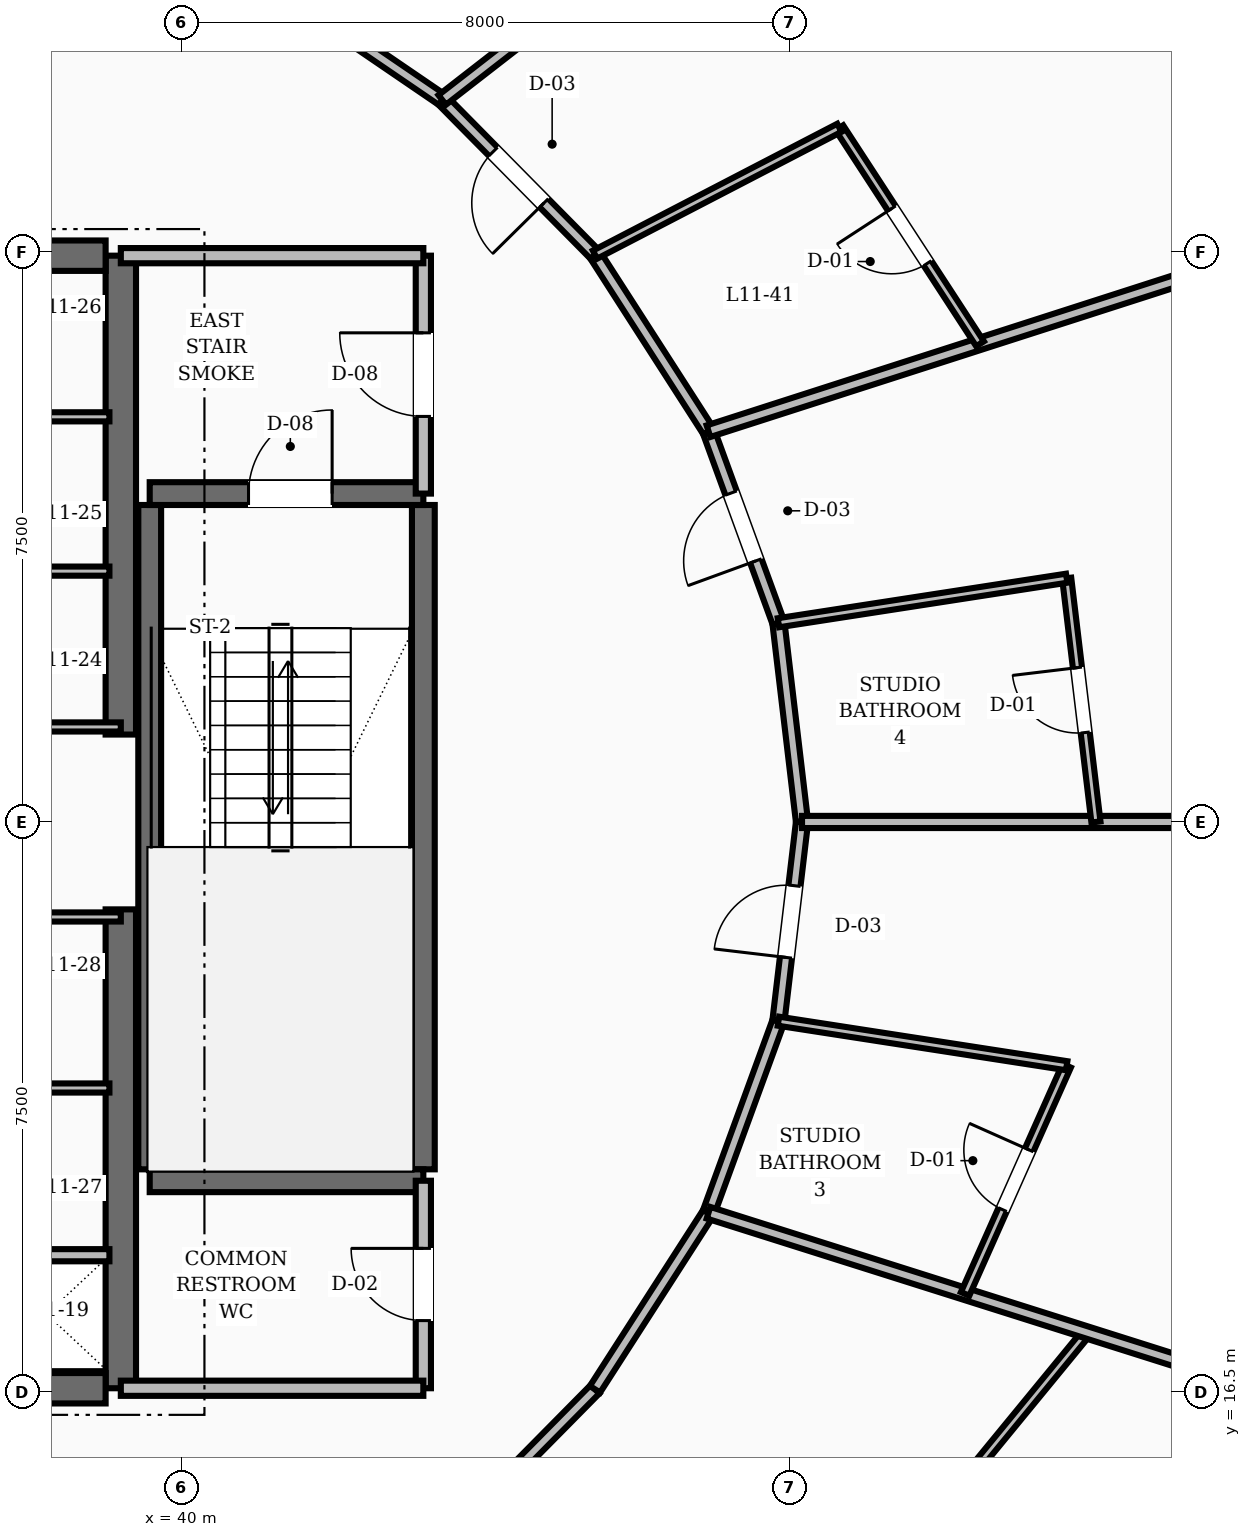
"""IFC4 building model, lengths in metres.
Left out: names, types, materials, properties, quantities, classifications, styles, units other than length and angle.
Written with IfcOpenShell. Run it as: python <this file> out.ifc"""

import sys

from ifc_helpers import new_model, si_unit, direction, frame, frame_2d, origin, place, context, subcontext, project, spatial, rectangle, extrude, element, fill, save


model = new_model("IFC4")
c1 = context("Model", 3, precision=1e-05, world=origin(), true_north=direction((0.0, 1.0)))
c2 = subcontext(c1, "Body", "Model", "MODEL_VIEW")
j1 = project(units=[si_unit("LENGTHUNIT", "METRE"), si_unit("PLANEANGLEUNIT", "RADIAN")], contexts=[c1])
p1 = place(None, origin())
s1 = spatial("IfcSite", under=j1, at=p1, CompositionType="ELEMENT")
p2 = place(p1, origin())
s2 = spatial("IfcBuilding", under=s1, at=p2, CompositionType="ELEMENT")
p3 = place(p2, frame((0.0, 0.0, 48.4)))
s3 = spatial("IfcBuildingStorey", under=s2, at=p3, CompositionType="ELEMENT", Elevation=48.4)
for number, where, z_axis, x_axis in (
    (1, (39.2, 16.55, 0.0), (0.0, 0.0, 1.0), (0.0, 1.0, 0.0)),
    (2, (39.2, 25.15, 0.0), (0.0, 0.0, 1.0), (0.0, 1.0, 0.0)),
):
    element("IfcWall", number, at=place(p3, frame(where, z_axis=z_axis, x_axis=x_axis)), inside=s3, PredefinedType="SHEAR", context=c2, shape_type="SweptSolid", body=[
        extrude(rectangle(XDim=6.3, YDim=0.4, at=frame_2d((3.15, 0.0))), origin(), (0.0, 0.0, 1.0), 3.6),
    ])
p4 = place(p3, frame((35.8, 16.55, 0.0), z_axis=(0.0, 0.0, 1.0), x_axis=(1.0, 0.0, 0.0)))
e3 = element("IfcWall", 3, at=p4, inside=s3, PredefinedType="SHEAR", context=c2, shape_type="SweptSolid", body=[
    extrude(rectangle(XDim=3.2, YDim=0.4, at=frame_2d((1.6, 0.0))), origin(), (0.0, 0.0, 1.0), 3.6),
])
p5 = place(p4, frame((0.3, 0.0, 0.0)))
e4 = element("IfcOpeningElement", 4, at=p5, cuts=e3, PredefinedType="OPENING", context=c2, shape_type="SweptSolid", body=[
    extrude(rectangle(XDim=1.1, YDim=2.1, at=frame_2d((0.55, 1.05))), frame((0.0, 0.21, 0.0), z_axis=(0.0, -1.0, 0.0), x_axis=(1.0, 0.0, 0.0)), (0.0, 0.0, 1.0), 0.42),
])
p6 = place(p3, frame((35.8, 31.45, 0.0), z_axis=(0.0, 0.0, 1.0), x_axis=(1.0, 0.0, 0.0)))
e5 = element("IfcWall", 5, at=p6, inside=s3, PredefinedType="SHEAR", context=c2, shape_type="SweptSolid", body=[
    extrude(rectangle(XDim=3.2, YDim=0.4, at=frame_2d((1.6, 0.0))), origin(), (0.0, 0.0, 1.0), 3.6),
])
p7 = place(p6, frame((0.3, 0.0, 0.0)))
e6 = element("IfcOpeningElement", 6, at=p7, cuts=e5, PredefinedType="OPENING", context=c2, shape_type="SweptSolid", body=[
    extrude(rectangle(XDim=1.1, YDim=2.1, at=frame_2d((0.55, 1.05))), frame((0.0, 0.21, 0.0), z_axis=(0.0, -1.0, 0.0), x_axis=(1.0, 0.0, 0.0)), (0.0, 0.0, 1.0), 0.42),
])
for number, where, z_axis, x_axis in (
    (7, (43.18, 19.43, 0.0), (0.0, 0.0, 1.0), (0.0, 1.0, 0.0)),
    (8, (39.58, 19.43, 0.0), (0.0, 0.0, 1.0), (0.0, 1.0, 0.0)),
):
    element("IfcWall", number, at=place(p3, frame(where, z_axis=z_axis, x_axis=x_axis)), inside=s3, PredefinedType="SHEAR", context=c2, shape_type="SweptSolid", body=[
        extrude(rectangle(XDim=8.74, YDim=0.3, at=frame_2d((4.37, 0.0))), origin(), (0.0, 0.0, 1.0), 3.6),
    ])
p8 = place(p3, frame((39.58, 19.28, 0.0), z_axis=(0.0, 0.0, 1.0), x_axis=(1.0, 0.0, 0.0)))
e9 = element("IfcWall", 9, at=p8, inside=s3, PredefinedType="SHEAR", context=c2, shape_type="SweptSolid", body=[
    extrude(rectangle(XDim=3.6, YDim=0.3, at=frame_2d((1.8, 0.0))), origin(), (0.0, 0.0, 1.0), 3.6),
])
p9 = place(p3, frame((39.58, 28.32, 0.0), z_axis=(0.0, 0.0, 1.0), x_axis=(1.0, 0.0, 0.0)))
e10 = element("IfcWall", 10, at=p9, inside=s3, PredefinedType="SHEAR", context=c2, shape_type="SweptSolid", body=[
    extrude(rectangle(XDim=3.6, YDim=0.3, at=frame_2d((1.8, 0.0))), origin(), (0.0, 0.0, 1.0), 3.6),
])
p10 = place(p9, frame((1.3, 0.0, 0.0)))
e11 = element("IfcOpeningElement", 11, at=p10, cuts=e10, PredefinedType="OPENING", context=c2, shape_type="SweptSolid", body=[
    extrude(rectangle(XDim=1.1, YDim=2.1, at=frame_2d((0.55, 1.05))), frame((0.0, 0.16, 0.0), z_axis=(0.0, -1.0, 0.0), x_axis=(1.0, 0.0, 0.0)), (0.0, 0.0, 1.0), 0.32),
])
p11 = place(p3, frame((43.18, 28.32, 0.0), z_axis=(0.0, 0.0, 1.0), x_axis=(0.0, 1.0, 0.0)))
e12 = element("IfcWall", 12, at=p11, inside=s3, PredefinedType="SOLIDWALL", context=c2, shape_type="SweptSolid", body=[
    extrude(rectangle(XDim=3.13, YDim=0.2, at=frame_2d((1.565, 0.0))), origin(), (0.0, 0.0, 1.0), 2.61),
])
p12 = place(p11, frame((1.015, 0.0, 0.0)))
e13 = element("IfcOpeningElement", 13, at=p12, cuts=e12, PredefinedType="OPENING", context=c2, shape_type="SweptSolid", body=[
    extrude(rectangle(XDim=1.1, YDim=2.1, at=frame_2d((0.55, 1.05))), frame((0.0, 0.11, 0.0), z_axis=(0.0, -1.0, 0.0), x_axis=(1.0, 0.0, 0.0)), (0.0, 0.0, 1.0), 0.22),
])
p13 = place(p3, frame((39.2, 31.45, 0.0), z_axis=(0.0, 0.0, 1.0), x_axis=(1.0, 0.0, 0.0)))
e14 = element("IfcWall", 14, at=p13, inside=s3, PredefinedType="SOLIDWALL", context=c2, shape_type="SweptSolid", body=[
    extrude(rectangle(XDim=3.98, YDim=0.2, at=frame_2d((1.99, 0.0))), origin(), (0.0, 0.0, 1.0), 2.61),
])
p14 = place(p3, frame((43.18, 16.55, 0.0), z_axis=(0.0, 0.0, 1.0), x_axis=(0.0, 1.0, 0.0)))
e15 = element("IfcWall", 15, at=p14, inside=s3, PredefinedType="SOLIDWALL", context=c2, shape_type="SweptSolid", body=[
    extrude(rectangle(XDim=2.73, YDim=0.2, at=frame_2d((1.365, 0.0))), origin(), (0.0, 0.0, 1.0), 2.61),
])
p15 = place(p14, frame((0.89, 0.0, 0.0)))
e16 = element("IfcOpeningElement", 16, at=p15, cuts=e15, PredefinedType="OPENING", context=c2, shape_type="SweptSolid", body=[
    extrude(rectangle(XDim=0.95, YDim=2.1, at=frame_2d((0.475, 1.05))), frame((0.0, 0.11, 0.0), z_axis=(0.0, -1.0, 0.0), x_axis=(1.0, 0.0, 0.0)), (0.0, 0.0, 1.0), 0.22),
])
p16 = place(p3, frame((39.2, 16.55, 0.0), z_axis=(0.0, 0.0, 1.0), x_axis=(1.0, 0.0, 0.0)))
e17 = element("IfcWall", 17, at=p16, inside=s3, PredefinedType="SOLIDWALL", context=c2, shape_type="SweptSolid", body=[
    extrude(rectangle(XDim=3.98, YDim=0.2, at=frame_2d((1.99, 0.0))), origin(), (0.0, 0.0, 1.0), 2.61),
])
p17 = place(p3, frame((37.4, 18.3, 0.0), z_axis=(0.0, 0.0, 1.0), x_axis=(1.0, 0.0, 0.0)))
e18 = element("IfcWall", 18, at=p17, inside=s3, PredefinedType="SOLIDWALL", context=c2, shape_type="SweptSolid", body=[
    extrude(rectangle(XDim=1.65, YDim=0.16, at=frame_2d((0.825, 0.0))), origin(), (0.0, 0.0, 1.0), 2.61),
])
for number, where, z_axis, x_axis in (
    (19, (37.4, 25.25, 0.0), (0.0, 0.0, 1.0), (1.0, 0.0, 0.0)),
    (20, (37.4, 22.75, 0.0), (0.0, 0.0, 1.0), (1.0, 0.0, 0.0)),
):
    element("IfcWall", number, at=place(p3, frame(where, z_axis=z_axis, x_axis=x_axis)), inside=s3, PredefinedType="PARTITIONING", context=c2, shape_type="SweptSolid", body=[
        extrude(rectangle(XDim=1.8, YDim=0.12, at=frame_2d((0.9, 0.0))), origin(), (0.0, 0.0, 1.0), 2.61),
    ])
for number, where, z_axis, x_axis in (
    (21, (37.4, 27.3, 0.0), (0.0, 0.0, 1.0), (1.0, 0.0, 0.0)),
    (22, (37.4, 29.33, 0.0), (0.0, 0.0, 1.0), (1.0, 0.0, 0.0)),
    (23, (37.4, 20.5, 0.0), (0.0, 0.0, 1.0), (1.0, 0.0, 0.0)),
):
    element("IfcWall", number, at=place(p3, frame(where, z_axis=z_axis, x_axis=x_axis)), inside=s3, PredefinedType="PARTITIONING", context=c2, shape_type="SweptSolid", body=[
        extrude(rectangle(XDim=1.65, YDim=0.12, at=frame_2d((0.825, 0.0))), origin(), (0.0, 0.0, 1.0), 2.61),
    ])
p18 = place(p3, frame((48.162, 24.0, 0.0), z_axis=(0.0, 0.0, 1.0), x_axis=(-0.117667763342, 0.993053018459, 0.0)))
e24 = element("IfcWall", 24, at=p18, inside=s3, PredefinedType="SOLIDWALL", context=c2, shape_type="SweptSolid", body=[
    extrude(rectangle(XDim=2.639, YDim=0.16, at=frame_2d((1.32, 0.0))), origin(), (0.0, 0.0, 1.0), 2.61),
])
p19 = place(p3, frame((47.852, 26.621, 0.0), z_axis=(0.0, 0.0, 1.0), x_axis=(-0.342882618672, 0.939378257047, 0.0)))
e25 = element("IfcWall", 25, at=p19, inside=s3, PredefinedType="SOLIDWALL", context=c2, shape_type="SweptSolid", body=[
    extrude(rectangle(XDim=2.683, YDim=0.16, at=frame_2d((1.341, 0.0))), origin(), (0.0, 0.0, 1.0), 2.61),
])
p20 = place(p19, frame((0.866, 0.0, 0.0)))
e26 = element("IfcOpeningElement", 26, at=p20, cuts=e25, PredefinedType="OPENING", context=c2, shape_type="SweptSolid", body=[
    extrude(rectangle(XDim=0.95, YDim=2.1, at=frame_2d((0.475, 1.05))), frame((0.0, 0.09, 0.0), z_axis=(0.0, -1.0, 0.0), x_axis=(1.0, 0.0, 0.0)), (0.0, 0.0, 1.0), 0.18),
])
p21 = place(p3, frame((46.932, 29.141, 0.0), z_axis=(0.0, 0.0, 1.0), x_axis=(-0.540891657444, 0.841092274907, 0.0)))
e27 = element("IfcWall", 27, at=p21, inside=s3, PredefinedType="SOLIDWALL", context=c2, shape_type="SweptSolid", body=[
    extrude(rectangle(XDim=2.761, YDim=0.16, at=frame_2d((1.38, 0.0))), origin(), (0.0, 0.0, 1.0), 2.61),
])
p22 = place(p3, frame((45.438, 31.463, 0.0), z_axis=(0.0, 0.0, 1.0), x_axis=(-0.702569520063, 0.711615113301, 0.0)))
e28 = element("IfcWall", 28, at=p22, inside=s3, PredefinedType="SOLIDWALL", context=c2, shape_type="SweptSolid", body=[
    extrude(rectangle(XDim=2.861, YDim=0.16, at=frame_2d((1.43, 0.0))), origin(), (0.0, 0.0, 1.0), 2.61),
])
p23 = place(p22, frame((0.955, 0.0, 0.0)))
e29 = element("IfcOpeningElement", 29, at=p23, cuts=e28, PredefinedType="OPENING", context=c2, shape_type="SweptSolid", body=[
    extrude(rectangle(XDim=0.95, YDim=2.1, at=frame_2d((0.475, 1.05))), frame((0.0, 0.09, 0.0), z_axis=(0.0, -1.0, 0.0), x_axis=(1.0, 0.0, 0.0)), (0.0, 0.0, 1.0), 0.18),
])
p24 = place(p3, frame((43.428, 33.499, 0.0), z_axis=(0.0, 0.0, 1.0), x_axis=(-0.826112340767, 0.563505457323, 0.0)))
e30 = element("IfcWall", 30, at=p24, inside=s3, PredefinedType="SOLIDWALL", context=c2, shape_type="SweptSolid", body=[
    extrude(rectangle(XDim=2.965, YDim=0.16, at=frame_2d((1.482, 0.0))), origin(), (0.0, 0.0, 1.0), 2.61),
])
p25 = place(p3, frame((43.428, 14.501, 0.0), z_axis=(0.0, 0.0, 1.0), x_axis=(0.702569520063, 0.711615113301, 0.0)))
e31 = element("IfcWall", 31, at=p25, inside=s3, PredefinedType="SOLIDWALL", context=c2, shape_type="SweptSolid", body=[
    extrude(rectangle(XDim=2.861, YDim=0.16, at=frame_2d((1.43, 0.0))), origin(), (0.0, 0.0, 1.0), 2.61),
])
p26 = place(p3, frame((45.438, 16.537, 0.0), z_axis=(0.0, 0.0, 1.0), x_axis=(0.540891657444, 0.841092274907, 0.0)))
e32 = element("IfcWall", 32, at=p26, inside=s3, PredefinedType="SOLIDWALL", context=c2, shape_type="SweptSolid", body=[
    extrude(rectangle(XDim=2.761, YDim=0.16, at=frame_2d((1.38, 0.0))), origin(), (0.0, 0.0, 1.0), 2.61),
])
p27 = place(p3, frame((46.932, 18.859, 0.0), z_axis=(0.0, 0.0, 1.0), x_axis=(0.342882618672, 0.939378257047, 0.0)))
e33 = element("IfcWall", 33, at=p27, inside=s3, PredefinedType="SOLIDWALL", context=c2, shape_type="SweptSolid", body=[
    extrude(rectangle(XDim=2.683, YDim=0.16, at=frame_2d((1.341, 0.0))), origin(), (0.0, 0.0, 1.0), 2.61),
])
p28 = place(p3, frame((47.852, 21.379, 0.0), z_axis=(0.0, 0.0, 1.0), x_axis=(0.117667763342, 0.993053018459, 0.0)))
e34 = element("IfcWall", 34, at=p28, inside=s3, PredefinedType="SOLIDWALL", context=c2, shape_type="SweptSolid", body=[
    extrude(rectangle(XDim=2.639, YDim=0.16, at=frame_2d((1.32, 0.0))), origin(), (0.0, 0.0, 1.0), 2.61),
])
p29 = place(p28, frame((0.844, 0.0, 0.0)))
e35 = element("IfcOpeningElement", 35, at=p29, cuts=e34, PredefinedType="OPENING", context=c2, shape_type="SweptSolid", body=[
    extrude(rectangle(XDim=0.95, YDim=2.1, at=frame_2d((0.475, 1.05))), frame((0.0, 0.09, 0.0), z_axis=(0.0, -1.0, 0.0), x_axis=(1.0, 0.0, 0.0)), (0.0, 0.0, 1.0), 0.18),
])
p30 = place(p3, frame((47.236, 11.593, 0.0), z_axis=(0.0, 0.0, 1.0), x_axis=(0.634298828671, 0.773087961326, 0.0)))
e36 = element("IfcWall", 36, at=p30, inside=s3, PredefinedType="PARTITIONING", context=c2, shape_type="SweptSolid", body=[
    extrude(rectangle(XDim=7.364, YDim=0.12, at=frame_2d((3.682, 0.0))), origin(), (0.0, 0.0, 1.0), 2.61),
])
p31 = place(p30, frame((3.207, 0.0, 0.0)))
e37 = element("IfcOpeningElement", 37, at=p31, cuts=e36, PredefinedType="OPENING", context=c2, shape_type="SweptSolid", body=[
    extrude(rectangle(XDim=0.95, YDim=2.1, at=frame_2d((0.475, 1.05))), frame((0.0, 0.07, 0.0), z_axis=(0.0, -1.0, 0.0), x_axis=(1.0, 0.0, 0.0)), (0.0, 0.0, 1.0), 0.14),
])
p32 = place(p3, frame((46.932, 18.859, 0.0), z_axis=(0.0, 0.0, 1.0), x_axis=(0.953436442202, -0.301594016322, 0.0)))
e38 = element("IfcWall", 38, at=p32, inside=s3, PredefinedType="SOLIDWALL", context=c2, shape_type="SweptSolid", body=[
    extrude(rectangle(XDim=9.268, YDim=0.16, at=frame_2d((4.634, 0.0))), origin(), (0.0, 0.0, 1.0), 2.61),
])
p33 = place(p3, frame((50.308, 17.791, 0.0), z_axis=(0.0, 0.0, 1.0), x_axis=(0.406676057564, 0.913572429643, 0.0)))
e39 = element("IfcWall", 39, at=p33, inside=s3, PredefinedType="PARTITIONING", context=c2, shape_type="SweptSolid", body=[
    extrude(rectangle(XDim=3.286, YDim=0.12, at=frame_2d((1.643, 0.0))), origin(), (0.0, 0.0, 1.0), 2.61),
])
p34 = place(p33, frame((1.213, 0.0, 0.0)))
e40 = element("IfcOpeningElement", 40, at=p34, cuts=e39, PredefinedType="OPENING", context=c2, shape_type="SweptSolid", body=[
    extrude(rectangle(XDim=0.86, YDim=2.1, at=frame_2d((0.43, 1.05))), frame((0.0, 0.07, 0.0), z_axis=(0.0, -1.0, 0.0), x_axis=(1.0, 0.0, 0.0)), (0.0, 0.0, 1.0), 0.14),
])
p35 = place(p3, frame((47.852, 21.379, 0.0), z_axis=(0.0, 0.0, 1.0), x_axis=(0.988274411208, -0.152688205671, 0.0)))
e41 = element("IfcWall", 41, at=p35, inside=s3, PredefinedType="PARTITIONING", context=c2, shape_type="SweptSolid", body=[
    extrude(rectangle(XDim=3.837, YDim=0.12, at=frame_2d((1.919, 0.0))), origin(), (0.0, 0.0, 1.0), 2.61),
])
p36 = place(p3, frame((48.162, 24.0, 0.0), z_axis=(0.0, 0.0, 1.0), x_axis=(1.0, 0.0, 0.0)))
e42 = element("IfcWall", 42, at=p36, inside=s3, PredefinedType="SOLIDWALL", context=c2, shape_type="SweptSolid", body=[
    extrude(rectangle(XDim=10.126, YDim=0.16, at=frame_2d((5.063, 0.0))), origin(), (0.0, 0.0, 1.0), 2.61),
])
p37 = place(p3, frame((52.029, 24.0, 0.0), z_axis=(0.0, 0.0, 1.0), x_axis=(-0.119130317154, 0.992878626789, 0.0)))
e43 = element("IfcWall", 43, at=p37, inside=s3, PredefinedType="PARTITIONING", context=c2, shape_type="SweptSolid", body=[
    extrude(rectangle(XDim=3.23, YDim=0.12, at=frame_2d((1.615, 0.0))), origin(), (0.0, 0.0, 1.0), 2.61),
])
p38 = place(p37, frame((1.185, 0.0, 0.0)))
e44 = element("IfcOpeningElement", 44, at=p38, cuts=e43, PredefinedType="OPENING", context=c2, shape_type="SweptSolid", body=[
    extrude(rectangle(XDim=0.86, YDim=2.1, at=frame_2d((0.43, 1.05))), frame((0.0, 0.07, 0.0), z_axis=(0.0, -1.0, 0.0), x_axis=(1.0, 0.0, 0.0)), (0.0, 0.0, 1.0), 0.14),
])
p39 = place(p3, frame((47.852, 26.621, 0.0), z_axis=(0.0, 0.0, 1.0), x_axis=(0.988274411208, 0.152688205671, 0.0)))
e45 = element("IfcWall", 45, at=p39, inside=s3, PredefinedType="PARTITIONING", context=c2, shape_type="SweptSolid", body=[
    extrude(rectangle(XDim=3.837, YDim=0.12, at=frame_2d((1.919, 0.0))), origin(), (0.0, 0.0, 1.0), 2.61),
])
p40 = place(p3, frame((46.932, 29.141, 0.0), z_axis=(0.0, 0.0, 1.0), x_axis=(0.951948128821, 0.306259301956, 0.0)))
e46 = element("IfcWall", 46, at=p40, inside=s3, PredefinedType="SOLIDWALL", context=c2, shape_type="SweptSolid", body=[
    extrude(rectangle(XDim=9.826, YDim=0.16, at=frame_2d((4.913, 0.0))), origin(), (0.0, 0.0, 1.0), 2.61),
])
p41 = place(p3, frame((50.504, 30.29, 0.0), z_axis=(0.0, 0.0, 1.0), x_axis=(-0.54574723604, 0.837949851933, 0.0)))
e47 = element("IfcWall", 47, at=p41, inside=s3, PredefinedType="PARTITIONING", context=c2, shape_type="SweptSolid", body=[
    extrude(rectangle(XDim=3.391, YDim=0.12, at=frame_2d((1.696, 0.0))), origin(), (0.0, 0.0, 1.0), 2.61),
])
p42 = place(p41, frame((1.266, 0.0, 0.0)))
e48 = element("IfcOpeningElement", 48, at=p42, cuts=e47, PredefinedType="OPENING", context=c2, shape_type="SweptSolid", body=[
    extrude(rectangle(XDim=0.86, YDim=2.1, at=frame_2d((0.43, 1.05))), frame((0.0, 0.07, 0.0), z_axis=(0.0, -1.0, 0.0), x_axis=(1.0, 0.0, 0.0)), (0.0, 0.0, 1.0), 0.14),
])
p43 = place(p3, frame((45.438, 31.463, 0.0), z_axis=(0.0, 0.0, 1.0), x_axis=(0.887571866108, 0.460669276699, 0.0)))
e49 = element("IfcWall", 49, at=p43, inside=s3, PredefinedType="PARTITIONING", context=c2, shape_type="SweptSolid", body=[
    extrude(rectangle(XDim=3.622, YDim=0.12, at=frame_2d((1.811, 0.0))), origin(), (0.0, 0.0, 1.0), 2.61),
])
p44 = place(p3, frame((43.428, 33.499, 0.0), z_axis=(0.0, 0.0, 1.0), x_axis=(0.789749576514, 0.613429381751, 0.0)))
e50 = element("IfcWall", 50, at=p44, inside=s3, PredefinedType="SOLIDWALL", context=c2, shape_type="SweptSolid", body=[
    extrude(rectangle(XDim=9.061, YDim=0.16, at=frame_2d((4.531, 0.0))), origin(), (0.0, 0.0, 1.0), 2.61),
])
p45 = place(p10, origin())
e51 = element("IfcDoor", 51, at=p45, inside=s3, OperationType="SINGLE_SWING_RIGHT", PredefinedType="DOOR", context=c2, shape_type="SweptSolid", body=[
    extrude(rectangle(XDim=1.1, YDim=2.1, at=frame_2d((0.55, 1.05))), frame((0.0, 0.025, 0.0), z_axis=(0.0, -1.0, 0.0), x_axis=(1.0, 0.0, 0.0)), (0.0, 0.0, 1.0), 0.05),
])
fill(e11, e51)
p46 = place(p12, origin())
e52 = element("IfcDoor", 52, at=p46, inside=s3, OperationType="SINGLE_SWING_RIGHT", PredefinedType="DOOR", context=c2, shape_type="SweptSolid", body=[
    extrude(rectangle(XDim=1.1, YDim=2.1, at=frame_2d((0.55, 1.05))), frame((0.0, 0.025, 0.0), z_axis=(0.0, -1.0, 0.0), x_axis=(1.0, 0.0, 0.0)), (0.0, 0.0, 1.0), 0.05),
])
fill(e13, e52)
p47 = place(p15, origin())
e53 = element("IfcDoor", 53, at=p47, inside=s3, OperationType="SINGLE_SWING_RIGHT", PredefinedType="DOOR", context=c2, shape_type="SweptSolid", body=[
    extrude(rectangle(XDim=0.95, YDim=2.1, at=frame_2d((0.475, 1.05))), frame((0.0, 0.025, 0.0), z_axis=(0.0, -1.0, 0.0), x_axis=(1.0, 0.0, 0.0)), (0.0, 0.0, 1.0), 0.05),
])
fill(e16, e53)
p48 = place(p34, origin())
e54 = element("IfcDoor", 54, at=p48, inside=s3, OperationType="SINGLE_SWING_RIGHT", PredefinedType="DOOR", context=c2, shape_type="SweptSolid", body=[
    extrude(rectangle(XDim=0.86, YDim=2.1, at=frame_2d((0.43, 1.05))), frame((0.0, 0.025, 0.0), z_axis=(0.0, -1.0, 0.0), x_axis=(1.0, 0.0, 0.0)), (0.0, 0.0, 1.0), 0.05),
])
fill(e40, e54)
p49 = place(p29, origin())
e55 = element("IfcDoor", 55, at=p49, inside=s3, OperationType="SINGLE_SWING_LEFT", PredefinedType="DOOR", context=c2, shape_type="SweptSolid", body=[
    extrude(rectangle(XDim=0.95, YDim=2.1, at=frame_2d((0.475, 1.05))), frame((0.0, 0.025, 0.0), z_axis=(0.0, -1.0, 0.0), x_axis=(1.0, 0.0, 0.0)), (0.0, 0.0, 1.0), 0.05),
])
fill(e35, e55)
p50 = place(p38, origin())
e56 = element("IfcDoor", 56, at=p50, inside=s3, OperationType="SINGLE_SWING_RIGHT", PredefinedType="DOOR", context=c2, shape_type="SweptSolid", body=[
    extrude(rectangle(XDim=0.86, YDim=2.1, at=frame_2d((0.43, 1.05))), frame((0.0, 0.025, 0.0), z_axis=(0.0, -1.0, 0.0), x_axis=(1.0, 0.0, 0.0)), (0.0, 0.0, 1.0), 0.05),
])
fill(e44, e56)
p51 = place(p20, origin())
e57 = element("IfcDoor", 57, at=p51, inside=s3, OperationType="SINGLE_SWING_LEFT", PredefinedType="DOOR", context=c2, shape_type="SweptSolid", body=[
    extrude(rectangle(XDim=0.95, YDim=2.1, at=frame_2d((0.475, 1.05))), frame((0.0, 0.025, 0.0), z_axis=(0.0, -1.0, 0.0), x_axis=(1.0, 0.0, 0.0)), (0.0, 0.0, 1.0), 0.05),
])
fill(e26, e57)
p52 = place(p42, origin())
e58 = element("IfcDoor", 58, at=p52, inside=s3, OperationType="SINGLE_SWING_RIGHT", PredefinedType="DOOR", context=c2, shape_type="SweptSolid", body=[
    extrude(rectangle(XDim=0.86, YDim=2.1, at=frame_2d((0.43, 1.05))), frame((0.0, 0.025, 0.0), z_axis=(0.0, -1.0, 0.0), x_axis=(1.0, 0.0, 0.0)), (0.0, 0.0, 1.0), 0.05),
])
fill(e48, e58)
p53 = place(p23, origin())
e59 = element("IfcDoor", 59, at=p53, inside=s3, OperationType="SINGLE_SWING_LEFT", PredefinedType="DOOR", context=c2, shape_type="SweptSolid", body=[
    extrude(rectangle(XDim=0.95, YDim=2.1, at=frame_2d((0.475, 1.05))), frame((0.0, 0.025, 0.0), z_axis=(0.0, -1.0, 0.0), x_axis=(1.0, 0.0, 0.0)), (0.0, 0.0, 1.0), 0.05),
])
fill(e29, e59)
save(model, sys.argv[1])
